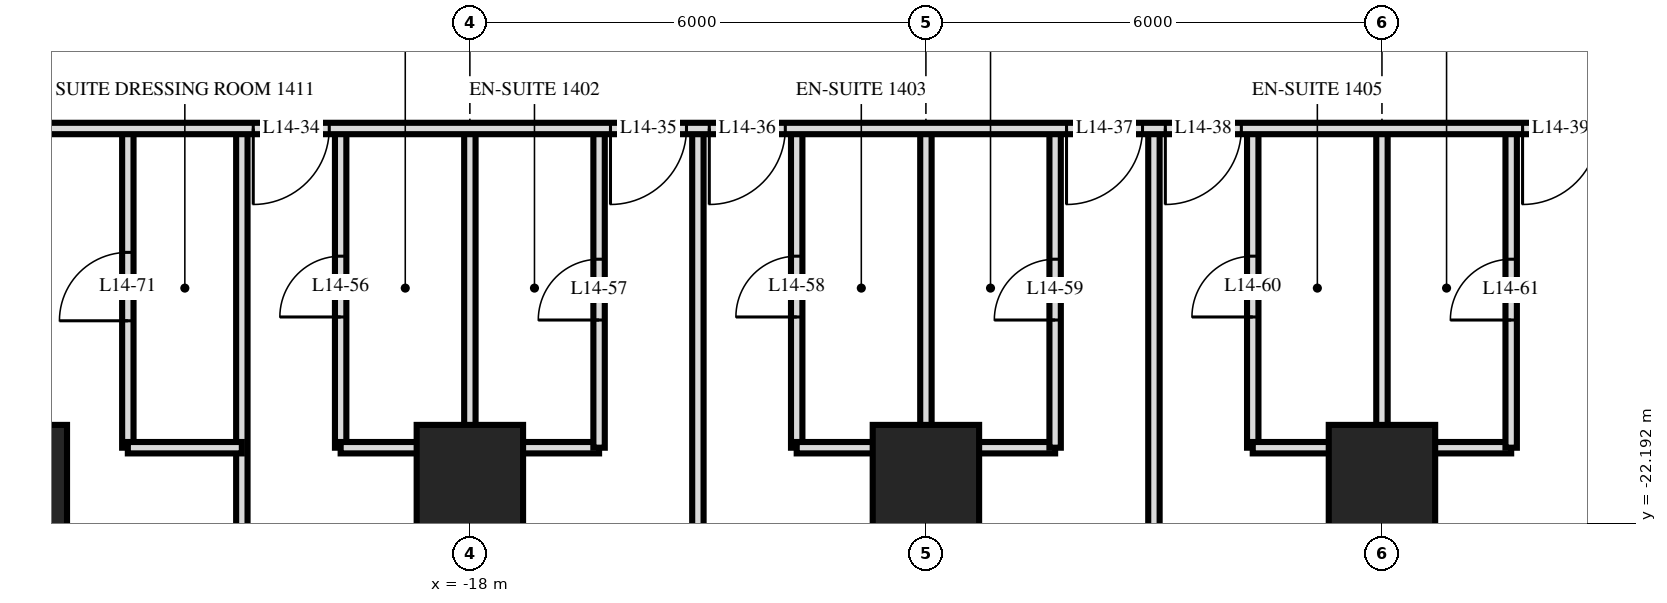
"""IFC4 building model, lengths in metres.
Left out: names, types, materials, properties, quantities, classifications, styles, units other than length and angle.
Written with IfcOpenShell. Run it as: python <this file> out.ifc"""

import sys

from ifc_helpers import new_model, si_unit, direction, frame, frame_2d, origin, origin_2d, place, context, subcontext, project, spatial, rectangle, extrude, element, fill, save


model = new_model("IFC4")
c1 = context("Model", 3, precision=1e-05, world=origin(), true_north=direction((0.0, 1.0)))
c2 = subcontext(c1, "Body", "Model", "MODEL_VIEW")
j1 = project(units=[si_unit("LENGTHUNIT", "METRE"), si_unit("PLANEANGLEUNIT", "RADIAN")], contexts=[c1])
p1 = place(None, origin())
s1 = spatial("IfcSite", under=j1, at=p1, CompositionType="ELEMENT")
p2 = place(p1, origin())
s2 = spatial("IfcBuilding", under=s1, at=p2, CompositionType="ELEMENT")
p3 = place(p2, frame((0.0, 0.0, 60.0)))
s3 = spatial("IfcBuildingStorey", under=s2, at=p3, CompositionType="ELEMENT", Elevation=60.0)
for number, where, z_axis, x_axis in (
    (1, (-24.0, -21.6, 0.0), (0.0, 0.0, 1.0), (1.0, 0.0, 0.0)),
    (2, (-18.0, -21.6, 0.0), (0.0, 0.0, 1.0), (1.0, 0.0, 0.0)),
    (3, (-12.0, -21.6, 0.0), (0.0, 0.0, 1.0), (1.0, 0.0, 0.0)),
    (4, (-6.0, -21.6, 0.0), (0.0, 0.0, 1.0), (1.0, 0.0, 0.0)),
):
    element("IfcColumn", number, at=place(p3, frame(where, z_axis=z_axis, x_axis=x_axis)), inside=s3, PredefinedType="COLUMN", context=c2, shape_type="SweptSolid", body=[
        extrude(rectangle(XDim=1.4, YDim=1.4, at=origin_2d()), origin(), (0.0, 0.0, 1.0), 3.6),
    ])
p4 = place(p3, frame((-4.3, -21.2, 0.0), z_axis=(0.0, 0.0, 1.0), x_axis=(0.0, 1.0, 0.0)))
e5 = element("IfcWall", 5, at=p4, inside=s3, PredefinedType="PARTITIONING", context=c2, shape_type="SweptSolid", body=[
    extrude(rectangle(XDim=4.2, YDim=0.15, at=frame_2d((2.1, 0.0))), origin(), (0.0, 0.0, 1.0), 3.32),
])
p5 = place(p4, frame((1.68, 0.0, 0.0)))
e6 = element("IfcOpeningElement", 6, at=p5, cuts=e5, PredefinedType="OPENING", context=c2, shape_type="SweptSolid", body=[
    extrude(rectangle(XDim=0.8, YDim=2.1, at=frame_2d((0.4, 1.05))), frame((0.0, 0.085, 0.0), z_axis=(0.0, -1.0, 0.0), x_axis=(1.0, 0.0, 0.0)), (0.0, 0.0, 1.0), 0.17),
])
p6 = place(p3, frame((-6.0, -29.22, 0.0), z_axis=(0.0, 0.0, 1.0), x_axis=(0.0, 1.0, 0.0)))
e7 = element("IfcWall", 7, at=p6, inside=s3, PredefinedType="PARTITIONING", context=c2, shape_type="SweptSolid", body=[
    extrude(rectangle(XDim=12.22, YDim=0.15, at=frame_2d((6.11, 0.0))), origin(), (0.0, 0.0, 1.0), 3.32),
])
p7 = place(p3, frame((-7.7, -21.2, 0.0), z_axis=(0.0, 0.0, 1.0), x_axis=(0.0, 1.0, 0.0)))
e8 = element("IfcWall", 8, at=p7, inside=s3, PredefinedType="PARTITIONING", context=c2, shape_type="SweptSolid", body=[
    extrude(rectangle(XDim=4.2, YDim=0.15, at=frame_2d((2.1, 0.0))), origin(), (0.0, 0.0, 1.0), 3.32),
])
p8 = place(p7, frame((1.72, 0.0, 0.0)))
e9 = element("IfcOpeningElement", 9, at=p8, cuts=e8, PredefinedType="OPENING", context=c2, shape_type="SweptSolid", body=[
    extrude(rectangle(XDim=0.8, YDim=2.1, at=frame_2d((0.4, 1.05))), frame((0.0, 0.085, 0.0), z_axis=(0.0, -1.0, 0.0), x_axis=(1.0, 0.0, 0.0)), (0.0, 0.0, 1.0), 0.17),
])
p9 = place(p3, frame((-9.0, -29.22, 0.0), z_axis=(0.0, 0.0, 1.0), x_axis=(0.0, 1.0, 0.0)))
e10 = element("IfcWall", 10, at=p9, inside=s3, PredefinedType="PARTITIONING", context=c2, shape_type="SweptSolid", body=[
    extrude(rectangle(XDim=12.22, YDim=0.15, at=frame_2d((6.11, 0.0))), origin(), (0.0, 0.0, 1.0), 3.32),
])
p10 = place(p3, frame((-10.3, -21.2, 0.0), z_axis=(0.0, 0.0, 1.0), x_axis=(0.0, 1.0, 0.0)))
e11 = element("IfcWall", 11, at=p10, inside=s3, PredefinedType="PARTITIONING", context=c2, shape_type="SweptSolid", body=[
    extrude(rectangle(XDim=4.2, YDim=0.15, at=frame_2d((2.1, 0.0))), origin(), (0.0, 0.0, 1.0), 3.32),
])
p11 = place(p10, frame((1.68, 0.0, 0.0)))
e12 = element("IfcOpeningElement", 12, at=p11, cuts=e11, PredefinedType="OPENING", context=c2, shape_type="SweptSolid", body=[
    extrude(rectangle(XDim=0.8, YDim=2.1, at=frame_2d((0.4, 1.05))), frame((0.0, 0.085, 0.0), z_axis=(0.0, -1.0, 0.0), x_axis=(1.0, 0.0, 0.0)), (0.0, 0.0, 1.0), 0.17),
])
p12 = place(p3, frame((-12.0, -29.22, 0.0), z_axis=(0.0, 0.0, 1.0), x_axis=(0.0, 1.0, 0.0)))
e13 = element("IfcWall", 13, at=p12, inside=s3, PredefinedType="PARTITIONING", context=c2, shape_type="SweptSolid", body=[
    extrude(rectangle(XDim=12.22, YDim=0.15, at=frame_2d((6.11, 0.0))), origin(), (0.0, 0.0, 1.0), 3.32),
])
p13 = place(p3, frame((-13.7, -21.2, 0.0), z_axis=(0.0, 0.0, 1.0), x_axis=(0.0, 1.0, 0.0)))
e14 = element("IfcWall", 14, at=p13, inside=s3, PredefinedType="PARTITIONING", context=c2, shape_type="SweptSolid", body=[
    extrude(rectangle(XDim=4.2, YDim=0.15, at=frame_2d((2.1, 0.0))), origin(), (0.0, 0.0, 1.0), 3.32),
])
p14 = place(p13, frame((1.72, 0.0, 0.0)))
e15 = element("IfcOpeningElement", 15, at=p14, cuts=e14, PredefinedType="OPENING", context=c2, shape_type="SweptSolid", body=[
    extrude(rectangle(XDim=0.8, YDim=2.1, at=frame_2d((0.4, 1.05))), frame((0.0, 0.085, 0.0), z_axis=(0.0, -1.0, 0.0), x_axis=(1.0, 0.0, 0.0)), (0.0, 0.0, 1.0), 0.17),
])
p15 = place(p3, frame((-15.0, -29.22, 0.0), z_axis=(0.0, 0.0, 1.0), x_axis=(0.0, 1.0, 0.0)))
e16 = element("IfcWall", 16, at=p15, inside=s3, PredefinedType="PARTITIONING", context=c2, shape_type="SweptSolid", body=[
    extrude(rectangle(XDim=12.22, YDim=0.15, at=frame_2d((6.11, 0.0))), origin(), (0.0, 0.0, 1.0), 3.32),
])
p16 = place(p3, frame((-16.3, -21.2, 0.0), z_axis=(0.0, 0.0, 1.0), x_axis=(0.0, 1.0, 0.0)))
e17 = element("IfcWall", 17, at=p16, inside=s3, PredefinedType="PARTITIONING", context=c2, shape_type="SweptSolid", body=[
    extrude(rectangle(XDim=4.2, YDim=0.15, at=frame_2d((2.1, 0.0))), origin(), (0.0, 0.0, 1.0), 3.32),
])
p17 = place(p16, frame((1.68, 0.0, 0.0)))
e18 = element("IfcOpeningElement", 18, at=p17, cuts=e17, PredefinedType="OPENING", context=c2, shape_type="SweptSolid", body=[
    extrude(rectangle(XDim=0.8, YDim=2.1, at=frame_2d((0.4, 1.05))), frame((0.0, 0.085, 0.0), z_axis=(0.0, -1.0, 0.0), x_axis=(1.0, 0.0, 0.0)), (0.0, 0.0, 1.0), 0.17),
])
p18 = place(p3, frame((-18.0, -29.22, 0.0), z_axis=(0.0, 0.0, 1.0), x_axis=(0.0, 1.0, 0.0)))
e19 = element("IfcWall", 19, at=p18, inside=s3, PredefinedType="PARTITIONING", context=c2, shape_type="SweptSolid", body=[
    extrude(rectangle(XDim=12.22, YDim=0.15, at=frame_2d((6.11, 0.0))), origin(), (0.0, 0.0, 1.0), 3.32),
])
p19 = place(p3, frame((-19.7, -21.2, 0.0), z_axis=(0.0, 0.0, 1.0), x_axis=(0.0, 1.0, 0.0)))
e20 = element("IfcWall", 20, at=p19, inside=s3, PredefinedType="PARTITIONING", context=c2, shape_type="SweptSolid", body=[
    extrude(rectangle(XDim=4.2, YDim=0.15, at=frame_2d((2.1, 0.0))), origin(), (0.0, 0.0, 1.0), 3.32),
])
p20 = place(p19, frame((1.72, 0.0, 0.0)))
e21 = element("IfcOpeningElement", 21, at=p20, cuts=e20, PredefinedType="OPENING", context=c2, shape_type="SweptSolid", body=[
    extrude(rectangle(XDim=0.8, YDim=2.1, at=frame_2d((0.4, 1.05))), frame((0.0, 0.085, 0.0), z_axis=(0.0, -1.0, 0.0), x_axis=(1.0, 0.0, 0.0)), (0.0, 0.0, 1.0), 0.17),
])
p21 = place(p3, frame((-21.0, -29.22, 0.0), z_axis=(0.0, 0.0, 1.0), x_axis=(0.0, 1.0, 0.0)))
e22 = element("IfcWall", 22, at=p21, inside=s3, PredefinedType="PARTITIONING", context=c2, shape_type="SweptSolid", body=[
    extrude(rectangle(XDim=12.22, YDim=0.15, at=frame_2d((6.11, 0.0))), origin(), (0.0, 0.0, 1.0), 3.32),
])
p22 = place(p3, frame((-22.5, -21.2, 0.0), z_axis=(0.0, 0.0, 1.0), x_axis=(0.0, 1.0, 0.0)))
e23 = element("IfcWall", 23, at=p22, inside=s3, PredefinedType="PARTITIONING", context=c2, shape_type="SweptSolid", body=[
    extrude(rectangle(XDim=4.2, YDim=0.15, at=frame_2d((2.1, 0.0))), origin(), (0.0, 0.0, 1.0), 3.32),
])
p23 = place(p22, frame((1.67, 0.0, 0.0)))
e24 = element("IfcOpeningElement", 24, at=p23, cuts=e23, PredefinedType="OPENING", context=c2, shape_type="SweptSolid", body=[
    extrude(rectangle(XDim=0.9, YDim=2.1, at=frame_2d((0.45, 1.05))), frame((0.0, 0.085, 0.0), z_axis=(0.0, -1.0, 0.0), x_axis=(1.0, 0.0, 0.0)), (0.0, 0.0, 1.0), 0.17),
])
p24 = place(p3, frame((-22.5, -21.2, 0.0), z_axis=(0.0, 0.0, 1.0), x_axis=(1.0, 0.0, 0.0)))
e25 = element("IfcWall", 25, at=p24, inside=s3, PredefinedType="PARTITIONING", context=c2, shape_type="SweptSolid", body=[
    extrude(rectangle(XDim=1.5, YDim=0.15, at=frame_2d((0.75, 0.0))), origin(), (0.0, 0.0, 1.0), 3.32),
])
for number, where, z_axis, x_axis in (
    (26, (-19.7, -21.2, 0.0), (0.0, 0.0, 1.0), (1.0, 0.0, 0.0)),
    (27, (-13.7, -21.2, 0.0), (0.0, 0.0, 1.0), (1.0, 0.0, 0.0)),
    (28, (-7.7, -21.2, 0.0), (0.0, 0.0, 1.0), (1.0, 0.0, 0.0)),
):
    element("IfcWall", number, at=place(p3, frame(where, z_axis=z_axis, x_axis=x_axis)), inside=s3, PredefinedType="PARTITIONING", context=c2, shape_type="SweptSolid", body=[
        extrude(rectangle(XDim=3.4, YDim=0.15, at=frame_2d((1.7, 0.0))), origin(), (0.0, 0.0, 1.0), 3.32),
    ])
p25 = place(p3, frame((-33.12, -17.0, 0.0), z_axis=(0.0, 0.0, 1.0), x_axis=(1.0, 0.0, 0.0)))
e29 = element("IfcWall", 29, at=p25, inside=s3, PredefinedType="PARTITIONING", context=c2, shape_type="SweptSolid", body=[
    extrude(rectangle(XDim=66.24, YDim=0.15, at=frame_2d((33.12, 0.0))), origin(), (0.0, 0.0, 1.0), 3.32),
])
p26 = place(p25, frame((12.27, 0.0, 0.0)))
e30 = element("IfcOpeningElement", 30, at=p26, cuts=e29, PredefinedType="OPENING", context=c2, shape_type="SweptSolid", body=[
    extrude(rectangle(XDim=1.0, YDim=2.1, at=frame_2d((0.5, 1.05))), frame((0.0, 0.085, 0.0), z_axis=(0.0, -1.0, 0.0), x_axis=(1.0, 0.0, 0.0)), (0.0, 0.0, 1.0), 0.17),
])
p27 = place(p25, frame((16.97, 0.0, 0.0)))
e31 = element("IfcOpeningElement", 31, at=p27, cuts=e29, PredefinedType="OPENING", context=c2, shape_type="SweptSolid", body=[
    extrude(rectangle(XDim=1.0, YDim=2.1, at=frame_2d((0.5, 1.05))), frame((0.0, 0.085, 0.0), z_axis=(0.0, -1.0, 0.0), x_axis=(1.0, 0.0, 0.0)), (0.0, 0.0, 1.0), 0.17),
])
p28 = place(p25, frame((18.27, 0.0, 0.0)))
e32 = element("IfcOpeningElement", 32, at=p28, cuts=e29, PredefinedType="OPENING", context=c2, shape_type="SweptSolid", body=[
    extrude(rectangle(XDim=1.0, YDim=2.1, at=frame_2d((0.5, 1.05))), frame((0.0, 0.085, 0.0), z_axis=(0.0, -1.0, 0.0), x_axis=(1.0, 0.0, 0.0)), (0.0, 0.0, 1.0), 0.17),
])
p29 = place(p25, frame((22.97, 0.0, 0.0)))
e33 = element("IfcOpeningElement", 33, at=p29, cuts=e29, PredefinedType="OPENING", context=c2, shape_type="SweptSolid", body=[
    extrude(rectangle(XDim=1.0, YDim=2.1, at=frame_2d((0.5, 1.05))), frame((0.0, 0.085, 0.0), z_axis=(0.0, -1.0, 0.0), x_axis=(1.0, 0.0, 0.0)), (0.0, 0.0, 1.0), 0.17),
])
p30 = place(p25, frame((24.27, 0.0, 0.0)))
e34 = element("IfcOpeningElement", 34, at=p30, cuts=e29, PredefinedType="OPENING", context=c2, shape_type="SweptSolid", body=[
    extrude(rectangle(XDim=1.0, YDim=2.1, at=frame_2d((0.5, 1.05))), frame((0.0, 0.085, 0.0), z_axis=(0.0, -1.0, 0.0), x_axis=(1.0, 0.0, 0.0)), (0.0, 0.0, 1.0), 0.17),
])
p31 = place(p25, frame((28.97, 0.0, 0.0)))
e35 = element("IfcOpeningElement", 35, at=p31, cuts=e29, PredefinedType="OPENING", context=c2, shape_type="SweptSolid", body=[
    extrude(rectangle(XDim=1.0, YDim=2.1, at=frame_2d((0.5, 1.05))), frame((0.0, 0.085, 0.0), z_axis=(0.0, -1.0, 0.0), x_axis=(1.0, 0.0, 0.0)), (0.0, 0.0, 1.0), 0.17),
])
p32 = place(p25, frame((30.27, 0.0, 0.0)))
e36 = element("IfcOpeningElement", 36, at=p32, cuts=e29, PredefinedType="OPENING", context=c2, shape_type="SweptSolid", body=[
    extrude(rectangle(XDim=1.0, YDim=2.1, at=frame_2d((0.5, 1.05))), frame((0.0, 0.085, 0.0), z_axis=(0.0, -1.0, 0.0), x_axis=(1.0, 0.0, 0.0)), (0.0, 0.0, 1.0), 0.17),
])
p33 = place(p25, frame((33.82, 0.0, 0.0)))
e37 = element("IfcOpeningElement", 37, at=p33, cuts=e29, PredefinedType="OPENING", context=c2, shape_type="SweptSolid", body=[
    extrude(rectangle(XDim=1.0, YDim=2.1, at=frame_2d((0.5, 1.05))), frame((0.0, 0.085, 0.0), z_axis=(0.0, -1.0, 0.0), x_axis=(1.0, 0.0, 0.0)), (0.0, 0.0, 1.0), 0.17),
])
p34 = place(p25, frame((46.27, 0.0, 0.0)))
e38 = element("IfcOpeningElement", 38, at=p34, cuts=e29, PredefinedType="OPENING", context=c2, shape_type="SweptSolid", body=[
    extrude(rectangle(XDim=1.0, YDim=2.1, at=frame_2d((0.5, 1.05))), frame((0.0, 0.085, 0.0), z_axis=(0.0, -1.0, 0.0), x_axis=(1.0, 0.0, 0.0)), (0.0, 0.0, 1.0), 0.17),
])
p35 = place(p25, frame((52.97, 0.0, 0.0)))
e39 = element("IfcOpeningElement", 39, at=p35, cuts=e29, PredefinedType="OPENING", context=c2, shape_type="SweptSolid", body=[
    extrude(rectangle(XDim=1.0, YDim=2.1, at=frame_2d((0.5, 1.05))), frame((0.0, 0.085, 0.0), z_axis=(0.0, -1.0, 0.0), x_axis=(1.0, 0.0, 0.0)), (0.0, 0.0, 1.0), 0.17),
])
p36 = place(p25, frame((6.05, 0.0, 0.0)))
e40 = element("IfcOpeningElement", 40, at=p36, cuts=e29, PredefinedType="OPENING", context=c2, shape_type="SweptSolid", body=[
    extrude(rectangle(XDim=1.0, YDim=2.1, at=frame_2d((0.5, 1.05))), frame((0.0, 0.085, 0.0), z_axis=(0.0, -1.0, 0.0), x_axis=(1.0, 0.0, 0.0)), (0.0, 0.0, 1.0), 0.17),
])
p37 = place(p25, frame((59.15, 0.0, 0.0)))
e41 = element("IfcOpeningElement", 41, at=p37, cuts=e29, PredefinedType="OPENING", context=c2, shape_type="SweptSolid", body=[
    extrude(rectangle(XDim=1.0, YDim=2.1, at=frame_2d((0.5, 1.05))), frame((0.0, 0.085, 0.0), z_axis=(0.0, -1.0, 0.0), x_axis=(1.0, 0.0, 0.0)), (0.0, 0.0, 1.0), 0.17),
])
p38 = place(p26, frame((0.5, 0.0, 0.0), z_axis=(0.0, 0.0, 1.0), x_axis=(-1.0, 0.0, 0.0)))
e42 = element("IfcDoor", 42, at=p38, inside=s3, OperationType="SINGLE_SWING_LEFT", PredefinedType="DOOR", context=c2, shape_type="SweptSolid", body=[
    extrude(rectangle(XDim=1.0, YDim=2.1, at=frame_2d((0.0, 1.05))), frame((0.0, -0.025, 0.0), z_axis=(0.0, 1.0, 0.0), x_axis=(-1.0, 0.0, 0.0)), (0.0, 0.0, 1.0), 0.05),
])
fill(e30, e42)
p39 = place(p27, frame((0.5, 0.0, 0.0), z_axis=(0.0, 0.0, 1.0), x_axis=(-1.0, 0.0, 0.0)))
e43 = element("IfcDoor", 43, at=p39, inside=s3, OperationType="SINGLE_SWING_LEFT", PredefinedType="DOOR", context=c2, shape_type="SweptSolid", body=[
    extrude(rectangle(XDim=1.0, YDim=2.1, at=frame_2d((0.0, 1.05))), frame((0.0, -0.025, 0.0), z_axis=(0.0, 1.0, 0.0), x_axis=(-1.0, 0.0, 0.0)), (0.0, 0.0, 1.0), 0.05),
])
fill(e31, e43)
p40 = place(p28, frame((0.5, 0.0, 0.0), z_axis=(0.0, 0.0, 1.0), x_axis=(-1.0, 0.0, 0.0)))
e44 = element("IfcDoor", 44, at=p40, inside=s3, OperationType="SINGLE_SWING_LEFT", PredefinedType="DOOR", context=c2, shape_type="SweptSolid", body=[
    extrude(rectangle(XDim=1.0, YDim=2.1, at=frame_2d((0.0, 1.05))), frame((0.0, -0.025, 0.0), z_axis=(0.0, 1.0, 0.0), x_axis=(-1.0, 0.0, 0.0)), (0.0, 0.0, 1.0), 0.05),
])
fill(e32, e44)
p41 = place(p29, frame((0.5, 0.0, 0.0), z_axis=(0.0, 0.0, 1.0), x_axis=(-1.0, 0.0, 0.0)))
e45 = element("IfcDoor", 45, at=p41, inside=s3, OperationType="SINGLE_SWING_LEFT", PredefinedType="DOOR", context=c2, shape_type="SweptSolid", body=[
    extrude(rectangle(XDim=1.0, YDim=2.1, at=frame_2d((0.0, 1.05))), frame((0.0, -0.025, 0.0), z_axis=(0.0, 1.0, 0.0), x_axis=(-1.0, 0.0, 0.0)), (0.0, 0.0, 1.0), 0.05),
])
fill(e33, e45)
p42 = place(p30, frame((0.5, 0.0, 0.0), z_axis=(0.0, 0.0, 1.0), x_axis=(-1.0, 0.0, 0.0)))
e46 = element("IfcDoor", 46, at=p42, inside=s3, OperationType="SINGLE_SWING_LEFT", PredefinedType="DOOR", context=c2, shape_type="SweptSolid", body=[
    extrude(rectangle(XDim=1.0, YDim=2.1, at=frame_2d((0.0, 1.05))), frame((0.0, -0.025, 0.0), z_axis=(0.0, 1.0, 0.0), x_axis=(-1.0, 0.0, 0.0)), (0.0, 0.0, 1.0), 0.05),
])
fill(e34, e46)
p43 = place(p31, frame((0.5, 0.0, 0.0), z_axis=(0.0, 0.0, 1.0), x_axis=(-1.0, 0.0, 0.0)))
e47 = element("IfcDoor", 47, at=p43, inside=s3, OperationType="SINGLE_SWING_LEFT", PredefinedType="DOOR", context=c2, shape_type="SweptSolid", body=[
    extrude(rectangle(XDim=1.0, YDim=2.1, at=frame_2d((0.0, 1.05))), frame((0.0, -0.025, 0.0), z_axis=(0.0, 1.0, 0.0), x_axis=(-1.0, 0.0, 0.0)), (0.0, 0.0, 1.0), 0.05),
])
fill(e35, e47)
p44 = place(p20, origin())
e48 = element("IfcDoor", 48, at=p44, inside=s3, OperationType="SINGLE_SWING_RIGHT", PredefinedType="DOOR", context=c2, shape_type="SweptSolid", body=[
    extrude(rectangle(XDim=0.8, YDim=2.1, at=frame_2d((0.4, 1.05))), frame((0.0, 0.025, 0.0), z_axis=(0.0, -1.0, 0.0), x_axis=(1.0, 0.0, 0.0)), (0.0, 0.0, 1.0), 0.05),
])
fill(e21, e48)
p45 = place(p17, origin())
e49 = element("IfcDoor", 49, at=p45, inside=s3, OperationType="SINGLE_SWING_RIGHT", PredefinedType="DOOR", context=c2, shape_type="SweptSolid", body=[
    extrude(rectangle(XDim=0.8, YDim=2.1, at=frame_2d((0.4, 1.05))), frame((0.0, 0.025, 0.0), z_axis=(0.0, -1.0, 0.0), x_axis=(1.0, 0.0, 0.0)), (0.0, 0.0, 1.0), 0.05),
])
fill(e18, e49)
p46 = place(p14, origin())
e50 = element("IfcDoor", 50, at=p46, inside=s3, OperationType="SINGLE_SWING_RIGHT", PredefinedType="DOOR", context=c2, shape_type="SweptSolid", body=[
    extrude(rectangle(XDim=0.8, YDim=2.1, at=frame_2d((0.4, 1.05))), frame((0.0, 0.025, 0.0), z_axis=(0.0, -1.0, 0.0), x_axis=(1.0, 0.0, 0.0)), (0.0, 0.0, 1.0), 0.05),
])
fill(e15, e50)
p47 = place(p11, origin())
e51 = element("IfcDoor", 51, at=p47, inside=s3, OperationType="SINGLE_SWING_RIGHT", PredefinedType="DOOR", context=c2, shape_type="SweptSolid", body=[
    extrude(rectangle(XDim=0.8, YDim=2.1, at=frame_2d((0.4, 1.05))), frame((0.0, 0.025, 0.0), z_axis=(0.0, -1.0, 0.0), x_axis=(1.0, 0.0, 0.0)), (0.0, 0.0, 1.0), 0.05),
])
fill(e12, e51)
p48 = place(p8, origin())
e52 = element("IfcDoor", 52, at=p48, inside=s3, OperationType="SINGLE_SWING_RIGHT", PredefinedType="DOOR", context=c2, shape_type="SweptSolid", body=[
    extrude(rectangle(XDim=0.8, YDim=2.1, at=frame_2d((0.4, 1.05))), frame((0.0, 0.025, 0.0), z_axis=(0.0, -1.0, 0.0), x_axis=(1.0, 0.0, 0.0)), (0.0, 0.0, 1.0), 0.05),
])
fill(e9, e52)
p49 = place(p5, origin())
e53 = element("IfcDoor", 53, at=p49, inside=s3, OperationType="SINGLE_SWING_RIGHT", PredefinedType="DOOR", context=c2, shape_type="SweptSolid", body=[
    extrude(rectangle(XDim=0.8, YDim=2.1, at=frame_2d((0.4, 1.05))), frame((0.0, 0.025, 0.0), z_axis=(0.0, -1.0, 0.0), x_axis=(1.0, 0.0, 0.0)), (0.0, 0.0, 1.0), 0.05),
])
fill(e6, e53)
p50 = place(p23, origin())
e54 = element("IfcDoor", 54, at=p50, inside=s3, OperationType="SINGLE_SWING_RIGHT", PredefinedType="DOOR", context=c2, shape_type="SweptSolid", body=[
    extrude(rectangle(XDim=0.9, YDim=2.1, at=frame_2d((0.45, 1.05))), frame((0.0, 0.025, 0.0), z_axis=(0.0, -1.0, 0.0), x_axis=(1.0, 0.0, 0.0)), (0.0, 0.0, 1.0), 0.05),
])
fill(e24, e54)
save(model, sys.argv[1])
